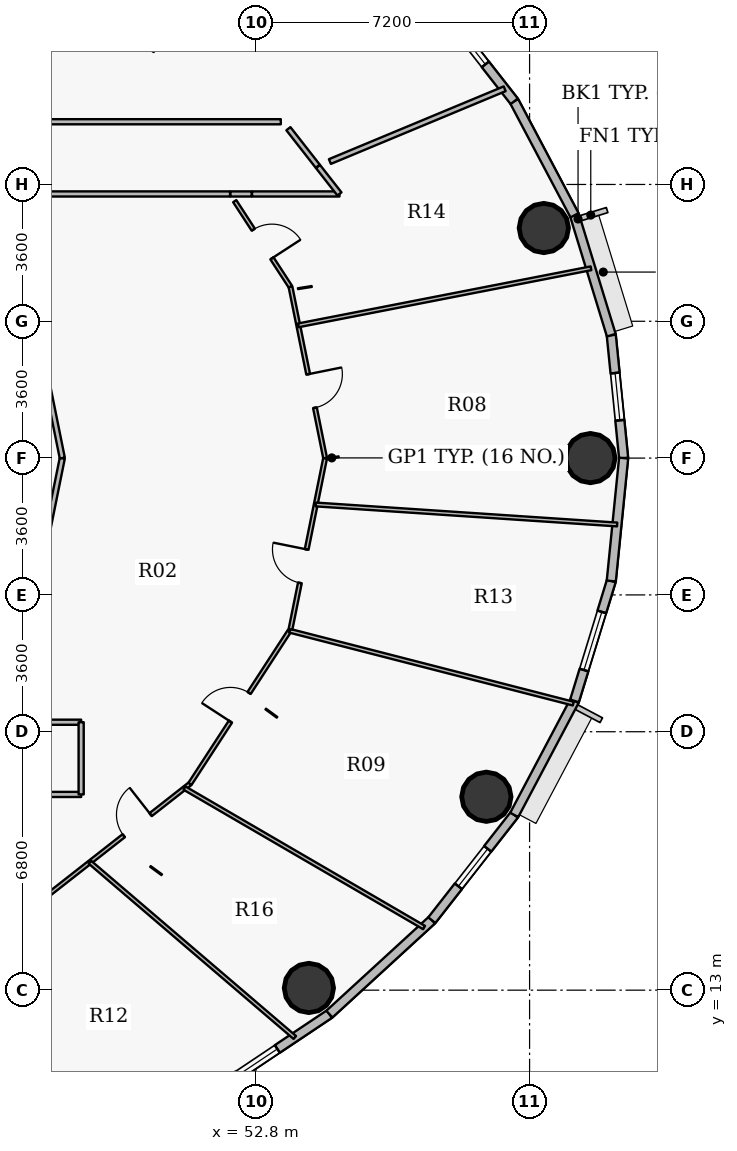
"""IFC4 building model, lengths in metres.
Left out: names, types, materials, properties, quantities, classifications, styles, units other than length and angle.
Written with IfcOpenShell. Run it as: python <this file> out.ifc"""

import sys

from ifc_helpers import new_model, si_unit, direction, frame, frame_2d, origin, origin_2d, place, context, subcontext, project, spatial, rectangle, hollow_circle, extrude, source, transform, mapped, element, fill, save


model = new_model("IFC4")
c1 = context("Model", 3, precision=1e-05, world=origin(), true_north=direction((0.0, 1.0)))
c2 = subcontext(c1, "Body", "Model", "MODEL_VIEW")
j1 = project(units=[si_unit("LENGTHUNIT", "METRE"), si_unit("PLANEANGLEUNIT", "RADIAN")], contexts=[c1])
p1 = place(None, origin())
s1 = spatial("IfcSite", under=j1, at=p1, CompositionType="ELEMENT")
p2 = place(p1, origin())
s2 = spatial("IfcBuilding", under=s1, at=p2, CompositionType="ELEMENT")
p3 = place(p2, frame((0.0, 0.0, 171.15)))
s3 = spatial("IfcBuildingStorey", under=s2, at=p3, CompositionType="ELEMENT", Elevation=171.15)
for number, where, z_axis, x_axis in (
    (1, (61.6, 27.0, 0.0), (0.0, 0.0, 1.0), (1.0, 0.0, 0.0)),
    (2, (60.375, 33.053, 0.0), (0.0, 0.0, 1.0), (1.0, 0.0, 0.0)),
    (3, (54.192, 13.058, 0.0), (0.0, 0.0, 1.0), (1.0, 0.0, 0.0)),
    (4, (58.863, 18.089, 0.0), (0.0, 0.0, 1.0), (1.0, 0.0, 0.0)),
):
    element("IfcColumn", number, at=place(p3, frame(where, z_axis=z_axis, x_axis=x_axis)), inside=s3, PredefinedType="COLUMN", context=c2, shape_type="SweptSolid", body=[
        extrude(hollow_circle(Radius=0.65, WallThickness=0.04, at=origin_2d()), origin(), (0.0, 0.0, 1.0), 3.75),
    ])
p4 = place(p3, frame((62.15, 30.234, 0.0), z_axis=(0.0, 0.0, 1.0), x_axis=(0.100061534614, -0.994981250723, 0.0)))
e5 = element("IfcWall", 5, at=p4, inside=s3, PredefinedType="SOLIDWALL", context=c2, shape_type="SweptSolid", body=[
    extrude(rectangle(XDim=3.25, YDim=0.24, at=frame_2d((1.625, 0.0))), origin(), (0.0, 0.0, 1.0), 3.5),
])
p5 = place(p4, frame((1.0, 0.0, 0.9)))
e6 = element("IfcOpeningElement", 6, at=p5, cuts=e5, PredefinedType="OPENING", context=c2, shape_type="SweptSolid", body=[
    extrude(rectangle(XDim=1.25, YDim=1.65, at=origin_2d()), frame((0.625, 0.13, 0.825), z_axis=(0.0, -1.0, 0.0), x_axis=(1.0, 0.0, 0.0)), (0.0, 0.0, 1.0), 0.26),
])
p6 = place(p3, frame((61.183, 33.389, 0.0), z_axis=(0.0, 0.0, 1.0), x_axis=(0.293097995113, -0.956082405058, 0.0)))
e7 = element("IfcWall", 7, at=p6, inside=s3, PredefinedType="SOLIDWALL", context=c2, shape_type="SweptSolid", body=[
    extrude(rectangle(XDim=3.3, YDim=0.24, at=frame_2d((1.65, 0.0))), origin(), (0.0, 0.0, 1.0), 3.5),
])
p7 = place(p3, frame((59.596, 36.388, 0.0), z_axis=(0.0, 0.0, 1.0), x_axis=(0.467586874938, -0.88394712194, 0.0)))
e8 = element("IfcWall", 8, at=p7, inside=s3, PredefinedType="SOLIDWALL", context=c2, shape_type="SweptSolid", body=[
    extrude(rectangle(XDim=3.393, YDim=0.24, at=frame_2d((1.697, 0.0))), origin(), (0.0, 0.0, 1.0), 3.5),
])
p8 = place(p3, frame((57.428, 39.158, 0.0), z_axis=(0.0, 0.0, 1.0), x_axis=(0.616287674549, -0.787521112224, 0.0)))
e9 = element("IfcWall", 9, at=p8, inside=s3, PredefinedType="SOLIDWALL", context=c2, shape_type="SweptSolid", body=[
    extrude(rectangle(XDim=3.517, YDim=0.24, at=frame_2d((1.759, 0.0))), origin(), (0.0, 0.0, 1.0), 3.5),
])
p9 = place(p8, frame((0.684, 0.0, 0.9)))
e10 = element("IfcOpeningElement", 10, at=p9, cuts=e9, PredefinedType="OPENING", context=c2, shape_type="SweptSolid", body=[
    extrude(rectangle(XDim=1.6, YDim=1.75, at=origin_2d()), frame((0.8, 0.13, 0.875), z_axis=(0.0, -1.0, 0.0), x_axis=(1.0, 0.0, 0.0)), (0.0, 0.0, 1.0), 0.26),
])
p10 = place(p3, frame((54.732, 12.369, 0.0), z_axis=(0.0, 0.0, 1.0), x_axis=(-0.831228998277, -0.555930168657, 0.0)))
e11 = element("IfcWall", 11, at=p10, inside=s3, PredefinedType="SOLIDWALL", context=c2, shape_type="SweptSolid", body=[
    extrude(rectangle(XDim=3.8, YDim=0.24, at=frame_2d((1.9, 0.0))), origin(), (0.0, 0.0, 1.0), 3.5),
])
p11 = place(p10, frame((1.648, 0.0, 0.9)))
e12 = element("IfcOpeningElement", 12, at=p11, cuts=e11, PredefinedType="OPENING", context=c2, shape_type="SweptSolid", body=[
    extrude(rectangle(XDim=1.25, YDim=1.65, at=origin_2d()), frame((0.625, 0.13, 0.825), z_axis=(0.0, -1.0, 0.0), x_axis=(1.0, 0.0, 0.0)), (0.0, 0.0, 1.0), 0.26),
])
p12 = place(p3, frame((57.428, 14.842, 0.0), z_axis=(0.0, 0.0, 1.0), x_axis=(-0.737076565834, -0.675809245349, 0.0)))
e13 = element("IfcWall", 13, at=p12, inside=s3, PredefinedType="SOLIDWALL", context=c2, shape_type="SweptSolid", body=[
    extrude(rectangle(XDim=3.658, YDim=0.24, at=frame_2d((1.829, 0.0))), origin(), (0.0, 0.0, 1.0), 3.5),
])
p13 = place(p3, frame((59.596, 17.612, 0.0), z_axis=(0.0, 0.0, 1.0), x_axis=(-0.616287674549, -0.787521112224, 0.0)))
e14 = element("IfcWall", 14, at=p13, inside=s3, PredefinedType="SOLIDWALL", context=c2, shape_type="SweptSolid", body=[
    extrude(rectangle(XDim=3.517, YDim=0.24, at=frame_2d((1.759, 0.0))), origin(), (0.0, 0.0, 1.0), 3.5),
])
p14 = place(p13, frame((1.134, 0.0, 0.9)))
e15 = element("IfcOpeningElement", 15, at=p14, cuts=e14, PredefinedType="OPENING", context=c2, shape_type="SweptSolid", body=[
    extrude(rectangle(XDim=1.25, YDim=1.65, at=origin_2d()), frame((0.625, 0.13, 0.825), z_axis=(0.0, -1.0, 0.0), x_axis=(1.0, 0.0, 0.0)), (0.0, 0.0, 1.0), 0.26),
])
p15 = place(p3, frame((61.183, 20.611, 0.0), z_axis=(0.0, 0.0, 1.0), x_axis=(-0.467586874938, -0.88394712194, 0.0)))
e16 = element("IfcWall", 16, at=p15, inside=s3, PredefinedType="SOLIDWALL", context=c2, shape_type="SweptSolid", body=[
    extrude(rectangle(XDim=3.393, YDim=0.24, at=frame_2d((1.697, 0.0))), origin(), (0.0, 0.0, 1.0), 3.5),
])
p16 = place(p3, frame((62.15, 23.766, 0.0), z_axis=(0.0, 0.0, 1.0), x_axis=(-0.293097995113, -0.956082405058, 0.0)))
e17 = element("IfcWall", 17, at=p16, inside=s3, PredefinedType="SOLIDWALL", context=c2, shape_type="SweptSolid", body=[
    extrude(rectangle(XDim=3.3, YDim=0.24, at=frame_2d((1.65, 0.0))), origin(), (0.0, 0.0, 1.0), 3.5),
])
p17 = place(p16, frame((0.85, 0.0, 0.9)))
e18 = element("IfcOpeningElement", 18, at=p17, cuts=e17, PredefinedType="OPENING", context=c2, shape_type="SweptSolid", body=[
    extrude(rectangle(XDim=1.6, YDim=1.75, at=origin_2d()), frame((0.8, 0.13, 0.875), z_axis=(0.0, -1.0, 0.0), x_axis=(1.0, 0.0, 0.0)), (0.0, 0.0, 1.0), 0.26),
])
p18 = place(p3, frame((62.475, 27.0, 0.0), z_axis=(0.0, 0.0, 1.0), x_axis=(-0.100061534614, -0.994981250723, 0.0)))
e19 = element("IfcWall", 19, at=p18, inside=s3, PredefinedType="SOLIDWALL", context=c2, shape_type="SweptSolid", body=[
    extrude(rectangle(XDim=3.25, YDim=0.24, at=frame_2d((1.625, 0.0))), origin(), (0.0, 0.0, 1.0), 3.5),
])
p19 = place(p3, frame((38.541, 18.15, 0.0), z_axis=(0.0, 0.0, 1.0), x_axis=(1.0, 0.0, 0.0)))
e20 = element("IfcWall", 20, at=p19, inside=s3, PredefinedType="PARTITIONING", context=c2, shape_type="SweptSolid", body=[
    extrude(rectangle(XDim=9.659, YDim=0.135, at=frame_2d((4.829, 0.0))), origin(), (0.0, 0.0, 1.0), 2.935),
])
p20 = place(p19, frame((5.568, 0.0, 0.0)))
e21 = element("IfcOpeningElement", 21, at=p20, cuts=e20, PredefinedType="OPENING", context=c2, shape_type="SweptSolid", body=[
    extrude(rectangle(XDim=1.0, YDim=2.15, at=origin_2d()), frame((0.5, 0.078, 1.075), z_axis=(0.0, -1.0, 0.0), x_axis=(1.0, 0.0, 0.0)), (0.0, 0.0, 1.0), 0.155),
])
p21 = place(p3, frame((44.438, 14.204, 0.0), z_axis=(0.0, 0.0, 1.0), x_axis=(0.550479331571, -0.834848792006, 0.0)))
e22 = element("IfcWall", 22, at=p21, inside=s3, PredefinedType="PARTITIONING", context=c2, shape_type="SweptSolid", body=[
    extrude(rectangle(XDim=6.712, YDim=0.1, at=frame_2d((3.356, 0.0))), origin(), (0.0, 0.0, 1.0), 2.935),
])
p22 = place(p3, frame((45.8, 20.05, 0.0), z_axis=(0.0, 0.0, 1.0), x_axis=(1.0, 0.0, 0.0)))
e23 = element("IfcWall", 23, at=p22, inside=s3, PredefinedType="PARTITIONING", context=c2, shape_type="SweptSolid", body=[
    extrude(rectangle(XDim=2.4, YDim=0.135, at=frame_2d((1.2, 0.0))), origin(), (0.0, 0.0, 1.0), 3.5),
])
p23 = place(p3, frame((45.8, 33.95, 0.0), z_axis=(0.0, 0.0, 1.0), x_axis=(1.0, 0.0, 0.0)))
e24 = element("IfcWall", 24, at=p23, inside=s3, PredefinedType="PARTITIONING", context=c2, shape_type="SweptSolid", body=[
    extrude(rectangle(XDim=6.318, YDim=0.135, at=frame_2d((3.159, 0.0))), origin(), (0.0, 0.0, 1.0), 3.5),
])
p24 = place(p3, frame((46.945, 15.204, 0.0), z_axis=(0.0, 0.0, 1.0), x_axis=(0.787300155222, 0.616569919463, 0.0)))
e25 = element("IfcWall", 25, at=p24, inside=s3, PredefinedType="PARTITIONING", context=c2, shape_type="SweptSolid", body=[
    extrude(rectangle(XDim=5.232, YDim=0.1, at=frame_2d((2.616, 0.0))), origin(), (0.0, 0.0, 1.0), 2.935),
])
p25 = place(p24, frame((3.018, 0.0, 0.0)))
e26 = element("IfcOpeningElement", 26, at=p25, cuts=e25, PredefinedType="OPENING", context=c2, shape_type="SweptSolid", body=[
    extrude(rectangle(XDim=0.9, YDim=2.1, at=origin_2d()), frame((0.45, 0.06, 1.05), z_axis=(0.0, -1.0, 0.0), x_axis=(1.0, 0.0, 0.0)), (0.0, 0.0, 1.0), 0.12),
])
p26 = place(p3, frame((48.2, 18.15, 0.0), z_axis=(0.0, 0.0, 1.0), x_axis=(0.0, 1.0, 0.0)))
e27 = element("IfcWall", 27, at=p26, inside=s3, PredefinedType="PARTITIONING", context=c2, shape_type="SweptSolid", body=[
    extrude(rectangle(XDim=1.9, YDim=0.135, at=frame_2d((0.95, 0.0))), origin(), (0.0, 0.0, 1.0), 3.5),
])
p27 = place(p3, frame((48.43, 16.367, 0.0), z_axis=(0.0, 0.0, 1.0), x_axis=(0.759902290403, -0.650037313575, 0.0)))
e28 = element("IfcWall", 28, at=p27, inside=s3, PredefinedType="PARTITIONING", context=c2, shape_type="SweptSolid", body=[
    extrude(rectangle(XDim=7.095, YDim=0.1, at=frame_2d((3.548, 0.0))), origin(), (0.0, 0.0, 1.0), 2.935),
])
p28 = place(p3, frame((50.92, 18.317, 0.0), z_axis=(0.0, 0.0, 1.0), x_axis=(0.864271351568, -0.50302587494, 0.0)))
e29 = element("IfcWall", 29, at=p28, inside=s3, PredefinedType="PARTITIONING", context=c2, shape_type="SweptSolid", body=[
    extrude(rectangle(XDim=7.294, YDim=0.1, at=frame_2d((3.647, 0.0))), origin(), (0.0, 0.0, 1.0), 2.935),
])
p29 = place(p3, frame((51.064, 18.429, 0.0), z_axis=(0.0, 0.0, 1.0), x_axis=(0.545379401359, 0.838189303542, 0.0)))
e30 = element("IfcWall", 30, at=p29, inside=s3, PredefinedType="PARTITIONING", context=c2, shape_type="SweptSolid", body=[
    extrude(rectangle(XDim=4.805, YDim=0.1, at=frame_2d((2.403, 0.0))), origin(), (0.0, 0.0, 1.0), 2.935),
])
p30 = place(p29, frame((1.953, 0.0, 0.0)))
e31 = element("IfcOpeningElement", 31, at=p30, cuts=e30, PredefinedType="OPENING", context=c2, shape_type="SweptSolid", body=[
    extrude(rectangle(XDim=0.9, YDim=2.1, at=origin_2d()), frame((0.45, 0.06, 1.05), z_axis=(0.0, -1.0, 0.0), x_axis=(1.0, 0.0, 0.0)), (0.0, 0.0, 1.0), 0.12),
])
p31 = place(p3, frame((52.241, 33.761, 0.0), z_axis=(0.0, 0.0, 1.0), x_axis=(0.545409337775, -0.838169824241, 0.0)))
e32 = element("IfcWall", 32, at=p31, inside=s3, PredefinedType="PARTITIONING", context=c2, shape_type="SweptSolid", body=[
    extrude(rectangle(XDim=2.69, YDim=0.1, at=frame_2d((1.345, 0.0))), origin(), (0.0, 0.0, 1.0), 2.935),
])
p32 = place(p31, frame((0.895, 0.0, 0.0)))
e33 = element("IfcOpeningElement", 33, at=p32, cuts=e32, PredefinedType="OPENING", context=c2, shape_type="SweptSolid", body=[
    extrude(rectangle(XDim=0.9, YDim=2.1, at=origin_2d()), frame((0.45, 0.06, 1.05), z_axis=(0.0, -1.0, 0.0), x_axis=(1.0, 0.0, 0.0)), (0.0, 0.0, 1.0), 0.12),
])
p33 = place(p3, frame((52.696, 33.95, 0.0), z_axis=(0.0, 0.0, 1.0), x_axis=(1.0, 0.0, 0.0)))
e34 = element("IfcWall", 34, at=p33, inside=s3, PredefinedType="PARTITIONING", context=c2, shape_type="SweptSolid", body=[
    extrude(rectangle(XDim=2.301, YDim=0.135, at=frame_2d((1.15, 0.0))), origin(), (0.0, 0.0, 1.0), 3.5),
])
p34 = place(p3, frame((53.685, 22.457, 0.0), z_axis=(0.0, 0.0, 1.0), x_axis=(0.968557288856, -0.248790631261, 0.0)))
e35 = element("IfcWall", 35, at=p34, inside=s3, PredefinedType="PARTITIONING", context=c2, shape_type="SweptSolid", body=[
    extrude(rectangle(XDim=7.708, YDim=0.1, at=frame_2d((3.854, 0.0))), origin(), (0.0, 0.0, 1.0), 2.935),
])
p35 = place(p3, frame((53.709, 22.494, 0.0), z_axis=(0.0, 0.0, 1.0), x_axis=(0.198209478932, 0.980159682124, 0.0)))
e36 = element("IfcWall", 36, at=p35, inside=s3, PredefinedType="PARTITIONING", context=c2, shape_type="SweptSolid", body=[
    extrude(rectangle(XDim=4.597, YDim=0.1, at=frame_2d((2.298, 0.0))), origin(), (0.0, 0.0, 1.0), 2.935),
])
p36 = place(p35, frame((1.246, 0.0, 0.0)))
e37 = element("IfcOpeningElement", 37, at=p36, cuts=e36, PredefinedType="OPENING", context=c2, shape_type="SweptSolid", body=[
    extrude(rectangle(XDim=0.9, YDim=2.1, at=origin_2d()), frame((0.45, 0.06, 1.05), z_axis=(0.0, -1.0, 0.0), x_axis=(1.0, 0.0, 0.0)), (0.0, 0.0, 1.0), 0.12),
])
p37 = place(p3, frame((53.709, 31.506, 0.0), z_axis=(0.0, 0.0, 1.0), x_axis=(0.19825018224, -0.980151450155, 0.0)))
e38 = element("IfcWall", 38, at=p37, inside=s3, PredefinedType="PARTITIONING", context=c2, shape_type="SweptSolid", body=[
    extrude(rectangle(XDim=4.597, YDim=0.1, at=frame_2d((2.299, 0.0))), origin(), (0.0, 0.0, 1.0), 2.935),
])
p38 = place(p37, frame((2.345, 0.0, 0.0)))
e39 = element("IfcOpeningElement", 39, at=p38, cuts=e38, PredefinedType="OPENING", context=c2, shape_type="SweptSolid", body=[
    extrude(rectangle(XDim=0.9, YDim=2.1, at=origin_2d()), frame((0.45, 0.06, 1.05), z_axis=(0.0, -1.0, 0.0), x_axis=(1.0, 0.0, 0.0)), (0.0, 0.0, 1.0), 0.12),
])
p39 = place(p3, frame((53.914, 30.493, 0.0), z_axis=(0.0, 0.0, 1.0), x_axis=(0.981522814431, 0.191345145616, 0.0)))
e40 = element("IfcWall", 40, at=p39, inside=s3, PredefinedType="PARTITIONING", context=c2, shape_type="SweptSolid", body=[
    extrude(rectangle(XDim=7.847, YDim=0.1, at=frame_2d((3.923, 0.0))), origin(), (0.0, 0.0, 1.0), 2.935),
])
p40 = place(p3, frame((54.373, 25.78, 0.0), z_axis=(0.0, 0.0, 1.0), x_axis=(0.997802925864, -0.066251951951, 0.0)))
e41 = element("IfcWall", 41, at=p40, inside=s3, PredefinedType="PARTITIONING", context=c2, shape_type="SweptSolid", body=[
    extrude(rectangle(XDim=7.949, YDim=0.1, at=frame_2d((3.974, 0.0))), origin(), (0.0, 0.0, 1.0), 2.935),
])
p41 = place(p3, frame((54.432, 34.672, 0.0), z_axis=(0.0, 0.0, 1.0), x_axis=(0.616351315364, -0.787471304905, 0.0)))
e42 = element("IfcWall", 42, at=p41, inside=s3, PredefinedType="PARTITIONING", context=c2, shape_type="SweptSolid", body=[
    extrude(rectangle(XDim=0.917, YDim=0.135, at=frame_2d((0.459, 0.0))), origin(), (0.0, 0.0, 1.0), 3.5),
])
p42 = place(p3, frame((43.703, 35.85, 0.0), z_axis=(0.0, 0.0, 1.0), x_axis=(1.0, 0.0, 0.0)))
e43 = element("IfcWall", 43, at=p42, inside=s3, PredefinedType="PARTITIONING", context=c2, shape_type="SweptSolid", body=[
    extrude(rectangle(XDim=9.751, YDim=0.135, at=frame_2d((4.875, 0.0))), origin(), (0.0, 0.0, 1.0), 2.935),
])
p43 = place(p3, frame((53.653, 35.667, 0.0), z_axis=(0.0, 0.0, 1.0), x_axis=(0.616271486236, -0.787533780388, 0.0)))
e44 = element("IfcWall", 44, at=p43, inside=s3, PredefinedType="PARTITIONING", context=c2, shape_type="SweptSolid", body=[
    extrude(rectangle(XDim=1.253, YDim=0.135, at=frame_2d((0.626, 0.0))), origin(), (0.0, 0.0, 1.0), 3.5),
])
p44 = place(p3, frame((52.686, 33.95, 0.0), z_axis=(0.0, 0.0, 1.0), x_axis=(-1.0, 0.0, 0.0)))
e45 = element("IfcWall", 45, at=p44, inside=s3, PredefinedType="PARTITIONING", context=c2, shape_type="SweptSolid", body=[
    extrude(rectangle(XDim=0.558, YDim=0.135, at=frame_2d((0.279, 0.0))), origin(), (0.0, 0.0, 1.0), 3.5),
])
p45 = place(p3, frame((50.858, 44.092, 0.0), z_axis=(0.0, 0.0, 1.0), x_axis=(-0.656061423317, -0.75470749886, 0.0)))
e46 = element("IfcWall", 46, at=p45, inside=s3, PredefinedType="PARTITIONING", context=c2, shape_type="SweptSolid", body=[
    extrude(rectangle(XDim=10.513, YDim=0.135, at=frame_2d((5.257, 0.0))), origin(), (0.0, 0.0, 1.0), 2.935),
])
for number, where, z_axis, x_axis in (
    (47, (47.131, 24.168, 0.0), (0.0, 0.0, 1.0), (0.198, 0.98, 0.0)),
    (48, (47.704, 27.0, 0.0), (0.0, 0.0, 1.0), (-0.198, 0.98, 0.0)),
):
    element("IfcWall", number, at=place(p3, frame(where, z_axis=z_axis, x_axis=x_axis)), inside=s3, PredefinedType="PARTITIONING", context=c2, shape_type="SweptSolid", body=[
        extrude(rectangle(XDim=2.89, YDim=0.135, at=frame_2d((1.445, 0.0))), origin(), (0.0, 0.0, 1.0), 2.935),
    ])
p46 = place(p3, frame((54.745, 34.803, 0.0), z_axis=(0.0, 0.0, 1.0), x_axis=(0.92320880582, 0.384298713055, 0.0)))
e49 = element("IfcWall", 49, at=p46, inside=s3, PredefinedType="PARTITIONING", context=c2, shape_type="SweptSolid", body=[
    extrude(rectangle(XDim=4.982, YDim=0.135, at=frame_2d((2.491, 0.0))), origin(), (0.0, 0.0, 1.0), 2.935),
])
m1 = source(origin(), c2, "Body", "SweptSolid", [
    extrude(rectangle(XDim=1.6, YDim=1.75, at=origin_2d()), frame((0.8, 0.03, 0.875), z_axis=(0.0, -1.0, 0.0), x_axis=(1.0, 0.0, 0.0)), (0.0, 0.0, 1.0), 0.06),
])
p47 = place(p9, origin())
e50 = element("IfcWindow", 50, at=p47, inside=s3, PartitioningType="DOUBLE_PANEL_VERTICAL", PredefinedType="WINDOW", context=c2, shape_type="MappedRepresentation", body=[
    mapped(m1, transform((0.0, 0.0, 0.0), x_axis=(1.0, 0.0, 0.0), y_axis=(0.0, 1.0, 0.0), z_axis=(0.0, 0.0, 1.0), scale=1.0)),
])
fill(e10, e50)
m2 = source(origin(), c2, "Body", "SweptSolid", [
    extrude(rectangle(XDim=1.25, YDim=1.65, at=origin_2d()), frame((0.625, 0.03, 0.825), z_axis=(0.0, -1.0, 0.0), x_axis=(1.0, 0.0, 0.0)), (0.0, 0.0, 1.0), 0.06),
])
p48 = place(p11, origin())
e51 = element("IfcWindow", 51, at=p48, inside=s3, PartitioningType="SINGLE_PANEL", PredefinedType="WINDOW", context=c2, shape_type="MappedRepresentation", body=[
    mapped(m2, transform((0.0, 0.0, 0.0), x_axis=(1.0, 0.0, 0.0), y_axis=(0.0, 1.0, 0.0), z_axis=(0.0, 0.0, 1.0), scale=1.0)),
])
fill(e12, e51)
p49 = place(p17, origin())
e52 = element("IfcWindow", 52, at=p49, inside=s3, PartitioningType="DOUBLE_PANEL_VERTICAL", PredefinedType="WINDOW", context=c2, shape_type="MappedRepresentation", body=[
    mapped(m1, transform((0.0, 0.0, 0.0), x_axis=(1.0, 0.0, 0.0), y_axis=(0.0, 1.0, 0.0), z_axis=(0.0, 0.0, 1.0), scale=1.0)),
])
fill(e18, e52)
p50 = place(p14, origin())
e53 = element("IfcWindow", 53, at=p50, inside=s3, PartitioningType="SINGLE_PANEL", PredefinedType="WINDOW", context=c2, shape_type="MappedRepresentation", body=[
    mapped(m2, transform((0.0, 0.0, 0.0), x_axis=(1.0, 0.0, 0.0), y_axis=(0.0, 1.0, 0.0), z_axis=(0.0, 0.0, 1.0), scale=1.0)),
])
fill(e15, e53)
p51 = place(p5, origin())
e54 = element("IfcWindow", 54, at=p51, inside=s3, PartitioningType="SINGLE_PANEL", PredefinedType="WINDOW", context=c2, shape_type="MappedRepresentation", body=[
    mapped(m2, transform((0.0, 0.0, 0.0), x_axis=(1.0, 0.0, 0.0), y_axis=(0.0, 1.0, 0.0), z_axis=(0.0, 0.0, 1.0), scale=1.0)),
])
fill(e6, e54)
m3 = source(origin(), c2, "Body", "SweptSolid", [
    extrude(rectangle(XDim=0.9, YDim=2.1, at=origin_2d()), frame((0.45, 0.025, 1.05), z_axis=(0.0, -1.0, 0.0), x_axis=(1.0, 0.0, 0.0)), (0.0, 0.0, 1.0), 0.05),
])
p52 = place(p25, origin())
e55 = element("IfcDoor", 55, at=p52, inside=s3, OperationType="SINGLE_SWING_RIGHT", PredefinedType="DOOR", context=c2, shape_type="MappedRepresentation", body=[
    mapped(m3, transform((0.0, 0.0, 0.0), x_axis=(1.0, 0.0, 0.0), y_axis=(0.0, 1.0, 0.0), z_axis=(0.0, 0.0, 1.0), scale=1.0)),
])
fill(e26, e55)
p53 = place(p30, origin())
e56 = element("IfcDoor", 56, at=p53, inside=s3, OperationType="SINGLE_SWING_LEFT", PredefinedType="DOOR", context=c2, shape_type="MappedRepresentation", body=[
    mapped(m3, transform((0.0, 0.0, 0.0), x_axis=(1.0, 0.0, 0.0), y_axis=(0.0, 1.0, 0.0), z_axis=(0.0, 0.0, 1.0), scale=1.0)),
])
fill(e31, e56)
p54 = place(p36, origin())
e57 = element("IfcDoor", 57, at=p54, inside=s3, OperationType="SINGLE_SWING_RIGHT", PredefinedType="DOOR", context=c2, shape_type="MappedRepresentation", body=[
    mapped(m3, transform((0.0, 0.0, 0.0), x_axis=(1.0, 0.0, 0.0), y_axis=(0.0, 1.0, 0.0), z_axis=(0.0, 0.0, 1.0), scale=1.0)),
])
fill(e37, e57)
p55 = place(p38, origin())
e58 = element("IfcDoor", 58, at=p55, inside=s3, OperationType="SINGLE_SWING_LEFT", PredefinedType="DOOR", context=c2, shape_type="MappedRepresentation", body=[
    mapped(m3, transform((0.0, 0.0, 0.0), x_axis=(1.0, 0.0, 0.0), y_axis=(0.0, 1.0, 0.0), z_axis=(0.0, 0.0, 1.0), scale=1.0)),
])
fill(e39, e58)
p56 = place(p32, origin())
e59 = element("IfcDoor", 59, at=p56, inside=s3, OperationType="SINGLE_SWING_RIGHT", PredefinedType="DOOR", context=c2, shape_type="MappedRepresentation", body=[
    mapped(m3, transform((0.0, 0.0, 0.0), x_axis=(1.0, 0.0, 0.0), y_axis=(0.0, 1.0, 0.0), z_axis=(0.0, 0.0, 1.0), scale=1.0)),
])
fill(e33, e59)
save(model, sys.argv[1])
